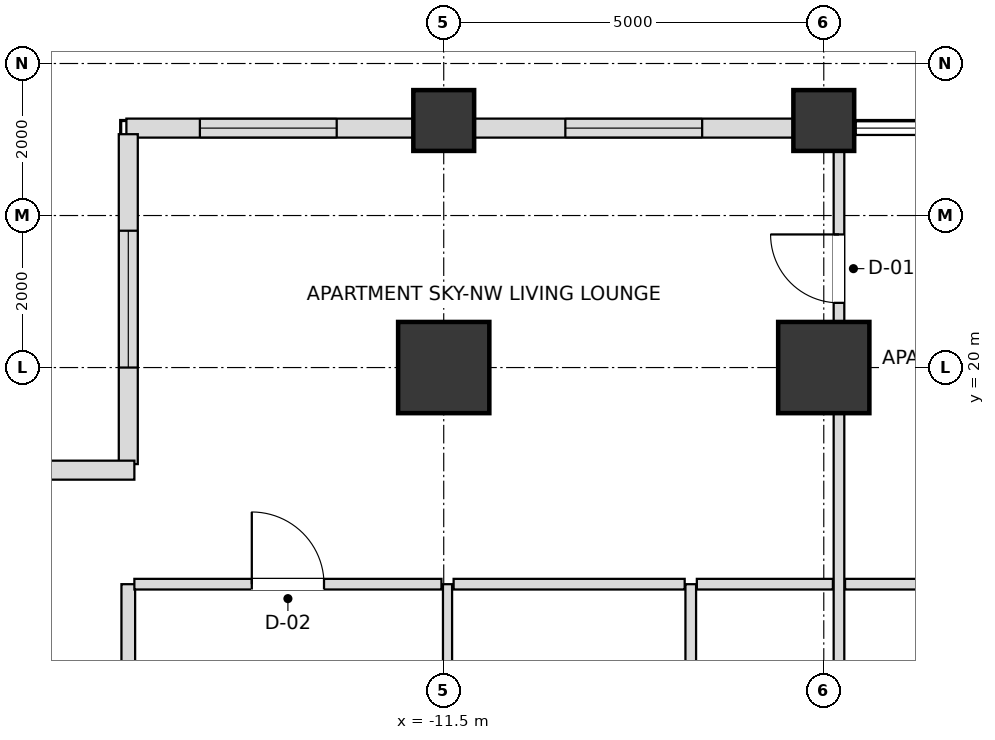
"""IFC4 building model, lengths in metres.
Left out: names, types, materials, properties, quantities, classifications, styles, units other than length and angle.
Written with IfcOpenShell. Run it as: python <this file> out.ifc"""

import sys

from ifc_helpers import new_model, si_unit, direction, frame, frame_2d, origin, origin_2d, place, context, subcontext, project, spatial, rectangle, extrude, element, fill, save


model = new_model("IFC4")
c1 = context("Model", 3, precision=1e-05, world=origin(), true_north=direction((0.0, 1.0)))
c2 = subcontext(c1, "Body", "Model", "MODEL_VIEW")
j1 = project(units=[si_unit("LENGTHUNIT", "METRE"), si_unit("PLANEANGLEUNIT", "RADIAN")], contexts=[c1])
p1 = place(None, origin())
s1 = spatial("IfcSite", under=j1, at=p1, CompositionType="ELEMENT")
p2 = place(p1, origin())
s2 = spatial("IfcBuilding", under=s1, at=p2, CompositionType="ELEMENT")
p3 = place(p2, frame((0.0, 0.0, 125.1)))
s3 = spatial("IfcBuildingStorey", under=s2, at=p3, CompositionType="ELEMENT", Elevation=125.1)
for number, where, z_axis, x_axis in (
    (1, (-6.5, 20.0, 0.0), (0.0, 0.0, 1.0), (1.0, 0.0, 0.0)),
    (2, (-11.5, 20.0, 0.0), (0.0, 0.0, 1.0), (1.0, 0.0, 0.0)),
):
    element("IfcColumn", number, at=place(p3, frame(where, z_axis=z_axis, x_axis=x_axis)), inside=s3, PredefinedType="USERDEFINED", context=c2, shape_type="SweptSolid", body=[
        extrude(rectangle(XDim=1.2, YDim=1.2, at=origin_2d()), origin(), (0.0, 0.0, 1.0), 4.5),
    ])
for number, where, z_axis, x_axis in (
    (3, (-11.5, 23.25, 0.0), (0.0, 0.0, 1.0), (1.0, 0.0, 0.0)),
    (4, (-6.5, 23.25, 0.0), (0.0, 0.0, 1.0), (1.0, 0.0, 0.0)),
):
    element("IfcColumn", number, at=place(p3, frame(where, z_axis=z_axis, x_axis=x_axis)), inside=s3, PredefinedType="COLUMN", context=c2, shape_type="SweptSolid", body=[
        extrude(rectangle(XDim=0.8, YDim=0.8, at=origin_2d()), origin(), (0.0, 0.0, 1.0), 4.5),
    ])
p4 = place(p3, frame((-6.895, 23.15, 0.0), z_axis=(0.0, 0.0, 1.0), x_axis=(-1.0, 0.0, 0.0)))
e5 = element("IfcWall", 5, at=p4, inside=s3, PredefinedType="SOLIDWALL", context=c2, shape_type="SweptSolid", body=[
    extrude(rectangle(XDim=4.21, YDim=0.25, at=frame_2d((2.105, 0.0))), origin(), (0.0, 0.0, 1.0), 3.636),
])
p5 = place(p4, frame((1.205, 0.0, 0.72)))
e6 = element("IfcOpeningElement", 6, at=p5, cuts=e5, PredefinedType="OPENING", context=c2, shape_type="SweptSolid", body=[
    extrude(rectangle(XDim=1.8, YDim=1.68, at=frame_2d((0.9, 0.84))), frame((0.0, 0.135, 0.0), z_axis=(0.0, -1.0, 0.0), x_axis=(1.0, 0.0, 0.0)), (0.0, 0.0, 1.0), 0.27),
])
p6 = place(p3, frame((-11.895, 23.15, 0.0), z_axis=(0.0, 0.0, 1.0), x_axis=(-1.0, 0.0, 0.0)))
e7 = element("IfcWall", 7, at=p6, inside=s3, PredefinedType="SOLIDWALL", context=c2, shape_type="SweptSolid", body=[
    extrude(rectangle(XDim=3.78, YDim=0.25, at=frame_2d((1.89, 0.0))), origin(), (0.0, 0.0, 1.0), 3.636),
])
p7 = place(p6, frame((1.013, 0.0, 0.72)))
e8 = element("IfcOpeningElement", 8, at=p7, cuts=e7, PredefinedType="OPENING", context=c2, shape_type="SweptSolid", body=[
    extrude(rectangle(XDim=1.8, YDim=1.68, at=frame_2d((0.9, 0.84))), frame((0.0, 0.135, 0.0), z_axis=(0.0, -1.0, 0.0), x_axis=(1.0, 0.0, 0.0)), (0.0, 0.0, 1.0), 0.27),
])
p8 = place(p3, frame((-15.65, 23.07, 0.0), z_axis=(0.0, 0.0, 1.0), x_axis=(0.0, -1.0, 0.0)))
e9 = element("IfcWall", 9, at=p8, inside=s3, PredefinedType="SOLIDWALL", context=c2, shape_type="SweptSolid", body=[
    extrude(rectangle(XDim=4.34, YDim=0.25, at=frame_2d((2.17, 0.0))), origin(), (0.0, 0.0, 1.0), 3.636),
])
p9 = place(p8, frame((1.27, 0.0, 0.72)))
e10 = element("IfcOpeningElement", 10, at=p9, cuts=e9, PredefinedType="OPENING", context=c2, shape_type="SweptSolid", body=[
    extrude(rectangle(XDim=1.8, YDim=1.68, at=frame_2d((0.9, 0.84))), frame((0.0, 0.135, 0.0), z_axis=(0.0, -1.0, 0.0), x_axis=(1.0, 0.0, 0.0)), (0.0, 0.0, 1.0), 0.27),
])
p10 = place(p3, frame((-15.57, 18.65, 0.0), z_axis=(0.0, 0.0, 1.0), x_axis=(-1.0, 0.0, 0.0)))
e11 = element("IfcWall", 11, at=p10, inside=s3, PredefinedType="SOLIDWALL", context=c2, shape_type="SweptSolid", body=[
    extrude(rectangle(XDim=4.66, YDim=0.25, at=frame_2d((2.33, 0.0))), origin(), (0.0, 0.0, 1.0), 3.636),
])
p11 = place(p10, frame((1.43, 0.0, 0.72)))
e12 = element("IfcOpeningElement", 12, at=p11, cuts=e11, PredefinedType="OPENING", context=c2, shape_type="SweptSolid", body=[
    extrude(rectangle(XDim=1.8, YDim=1.68, at=frame_2d((0.9, 0.84))), frame((0.0, 0.135, 0.0), z_axis=(0.0, -1.0, 0.0), x_axis=(1.0, 0.0, 0.0)), (0.0, 0.0, 1.0), 0.27),
])
p12 = place(p3, frame((-15.65, 9.8, 0.0), z_axis=(0.0, 0.0, 1.0), x_axis=(0.0, 1.0, 0.0)))
e13 = element("IfcWall", 13, at=p12, inside=s3, PredefinedType="PARTITIONING", context=c2, shape_type="SweptSolid", body=[
    extrude(rectangle(XDim=7.35, YDim=0.18, at=frame_2d((3.675, 0.0))), origin(), (0.0, 0.0, 1.0), 3.636),
])
p13 = place(p3, frame((-11.45, 9.8, 0.0), z_axis=(0.0, 0.0, 1.0), x_axis=(0.0, 1.0, 0.0)))
e14 = element("IfcWall", 14, at=p13, inside=s3, PredefinedType="PARTITIONING", context=c2, shape_type="SweptSolid", body=[
    extrude(rectangle(XDim=7.35, YDim=0.12, at=frame_2d((3.675, 0.0))), origin(), (0.0, 0.0, 1.0), 3.636),
])
p14 = place(p13, frame((3.713, 0.0, 0.0)))
e15 = element("IfcOpeningElement", 15, at=p14, cuts=e14, PredefinedType="OPENING", context=c2, shape_type="SweptSolid", body=[
    extrude(rectangle(XDim=0.95, YDim=2.1, at=frame_2d((0.475, 1.05))), frame((0.0, 0.07, 0.0), z_axis=(0.0, -1.0, 0.0), x_axis=(1.0, 0.0, 0.0)), (0.0, 0.0, 1.0), 0.14),
])
p15 = place(p3, frame((-8.25, 9.8, 0.0), z_axis=(0.0, 0.0, 1.0), x_axis=(0.0, 1.0, 0.0)))
e16 = element("IfcWall", 16, at=p15, inside=s3, PredefinedType="PARTITIONING", context=c2, shape_type="SweptSolid", body=[
    extrude(rectangle(XDim=7.35, YDim=0.14, at=frame_2d((3.675, 0.0))), origin(), (0.0, 0.0, 1.0), 3.716),
])
p16 = place(p15, frame((3.22, 0.0, 0.0)))
e17 = element("IfcOpeningElement", 17, at=p16, cuts=e16, PredefinedType="OPENING", context=c2, shape_type="SweptSolid", body=[
    extrude(rectangle(XDim=0.9, YDim=2.1, at=frame_2d((0.45, 1.05))), frame((0.0, 0.08, 0.0), z_axis=(0.0, -1.0, 0.0), x_axis=(1.0, 0.0, 0.0)), (0.0, 0.0, 1.0), 0.16),
])
p17 = place(p3, frame((-6.3, 9.8, 0.0), z_axis=(0.0, 0.0, 1.0), x_axis=(0.0, 1.0, 0.0)))
e18 = element("IfcWall", 18, at=p17, inside=s3, PredefinedType="PARTITIONING", context=c2, shape_type="SweptSolid", body=[
    extrude(rectangle(XDim=13.35, YDim=0.14, at=frame_2d((6.675, 0.0))), origin(), (0.0, 0.0, 1.0), 3.716),
])
p18 = place(p17, frame((11.051, 0.0, 0.0)))
e19 = element("IfcOpeningElement", 19, at=p18, cuts=e18, PredefinedType="OPENING", context=c2, shape_type="SweptSolid", body=[
    extrude(rectangle(XDim=0.9, YDim=2.1, at=frame_2d((0.45, 1.05))), frame((0.0, 0.08, 0.0), z_axis=(0.0, -1.0, 0.0), x_axis=(1.0, 0.0, 0.0)), (0.0, 0.0, 1.0), 0.16),
])
p19 = place(p3, frame((-15.57, 17.15, 0.0), z_axis=(0.0, 0.0, 1.0), x_axis=(1.0, 0.0, 0.0)))
e20 = element("IfcWall", 20, at=p19, inside=s3, PredefinedType="PARTITIONING", context=c2, shape_type="SweptSolid", body=[
    extrude(rectangle(XDim=4.04, YDim=0.14, at=frame_2d((2.02, 0.0))), origin(), (0.0, 0.0, 1.0), 3.636),
])
p20 = place(p19, frame((1.545, 0.0, 0.0)))
e21 = element("IfcOpeningElement", 21, at=p20, cuts=e20, PredefinedType="OPENING", context=c2, shape_type="SweptSolid", body=[
    extrude(rectangle(XDim=0.95, YDim=2.1, at=frame_2d((0.475, 1.05))), frame((0.0, 0.08, 0.0), z_axis=(0.0, -1.0, 0.0), x_axis=(1.0, 0.0, 0.0)), (0.0, 0.0, 1.0), 0.16),
])
p21 = place(p3, frame((-11.37, 17.15, 0.0), z_axis=(0.0, 0.0, 1.0), x_axis=(1.0, 0.0, 0.0)))
e22 = element("IfcWall", 22, at=p21, inside=s3, PredefinedType="PARTITIONING", context=c2, shape_type="SweptSolid", body=[
    extrude(rectangle(XDim=3.04, YDim=0.14, at=frame_2d((1.52, 0.0))), origin(), (0.0, 0.0, 1.0), 4.28),
])
p22 = place(p3, frame((-8.17, 17.15, 0.0), z_axis=(0.0, 0.0, 1.0), x_axis=(1.0, 0.0, 0.0)))
e23 = element("IfcWall", 23, at=p22, inside=s3, PredefinedType="PARTITIONING", context=c2, shape_type="SweptSolid", body=[
    extrude(rectangle(XDim=1.79, YDim=0.14, at=frame_2d((0.895, 0.0))), origin(), (0.0, 0.0, 1.0), 3.716),
])
p23 = place(p3, frame((-6.22, 17.15, 0.0), z_axis=(0.0, 0.0, 1.0), x_axis=(1.0, 0.0, 0.0)))
e24 = element("IfcWall", 24, at=p23, inside=s3, PredefinedType="PARTITIONING", context=c2, shape_type="SweptSolid", body=[
    extrude(rectangle(XDim=4.94, YDim=0.14, at=frame_2d((2.47, 0.0))), origin(), (0.0, 0.0, 1.0), 4.28),
])
p24 = place(p23, frame((1.995, 0.0, 0.0)))
e25 = element("IfcOpeningElement", 25, at=p24, cuts=e24, PredefinedType="OPENING", context=c2, shape_type="SweptSolid", body=[
    extrude(rectangle(XDim=0.95, YDim=2.1, at=frame_2d((0.475, 1.05))), frame((0.0, 0.08, 0.0), z_axis=(0.0, -1.0, 0.0), x_axis=(1.0, 0.0, 0.0)), (0.0, 0.0, 1.0), 0.16),
])
p25 = place(p5, origin())
e26 = element("IfcWindow", 26, at=p25, inside=s3, PartitioningType="SINGLE_PANEL", PredefinedType="WINDOW", context=c2, shape_type="SweptSolid", body=[
    extrude(rectangle(XDim=1.8, YDim=1.68, at=frame_2d((0.9, 0.84))), frame((0.0, 0.03, 0.0), z_axis=(0.0, -1.0, 0.0), x_axis=(1.0, 0.0, 0.0)), (0.0, 0.0, 1.0), 0.06),
])
fill(e6, e26)
p26 = place(p7, origin())
e27 = element("IfcWindow", 27, at=p26, inside=s3, PartitioningType="SINGLE_PANEL", PredefinedType="WINDOW", context=c2, shape_type="SweptSolid", body=[
    extrude(rectangle(XDim=1.8, YDim=1.68, at=frame_2d((0.9, 0.84))), frame((0.0, 0.03, 0.0), z_axis=(0.0, -1.0, 0.0), x_axis=(1.0, 0.0, 0.0)), (0.0, 0.0, 1.0), 0.06),
])
fill(e8, e27)
p27 = place(p9, origin())
e28 = element("IfcWindow", 28, at=p27, inside=s3, PartitioningType="SINGLE_PANEL", PredefinedType="WINDOW", context=c2, shape_type="SweptSolid", body=[
    extrude(rectangle(XDim=1.8, YDim=1.68, at=frame_2d((0.9, 0.84))), frame((0.0, 0.03, 0.0), z_axis=(0.0, -1.0, 0.0), x_axis=(1.0, 0.0, 0.0)), (0.0, 0.0, 1.0), 0.06),
])
fill(e10, e28)
p28 = place(p20, origin())
e29 = element("IfcDoor", 29, at=p28, inside=s3, OperationType="SINGLE_SWING_LEFT", PredefinedType="DOOR", context=c2, shape_type="SweptSolid", body=[
    extrude(rectangle(XDim=0.95, YDim=2.1, at=frame_2d((0.475, 1.05))), frame((0.0, 0.025, 0.0), z_axis=(0.0, -1.0, 0.0), x_axis=(1.0, 0.0, 0.0)), (0.0, 0.0, 1.0), 0.05),
])
fill(e21, e29)
p29 = place(p18, origin())
e30 = element("IfcDoor", 30, at=p29, inside=s3, OperationType="SINGLE_SWING_RIGHT", PredefinedType="DOOR", context=c2, shape_type="SweptSolid", body=[
    extrude(rectangle(XDim=0.9, YDim=2.1, at=frame_2d((0.45, 1.05))), frame((0.0, 0.025, 0.0), z_axis=(0.0, -1.0, 0.0), x_axis=(1.0, 0.0, 0.0)), (0.0, 0.0, 1.0), 0.05),
])
fill(e19, e30)
save(model, sys.argv[1])
